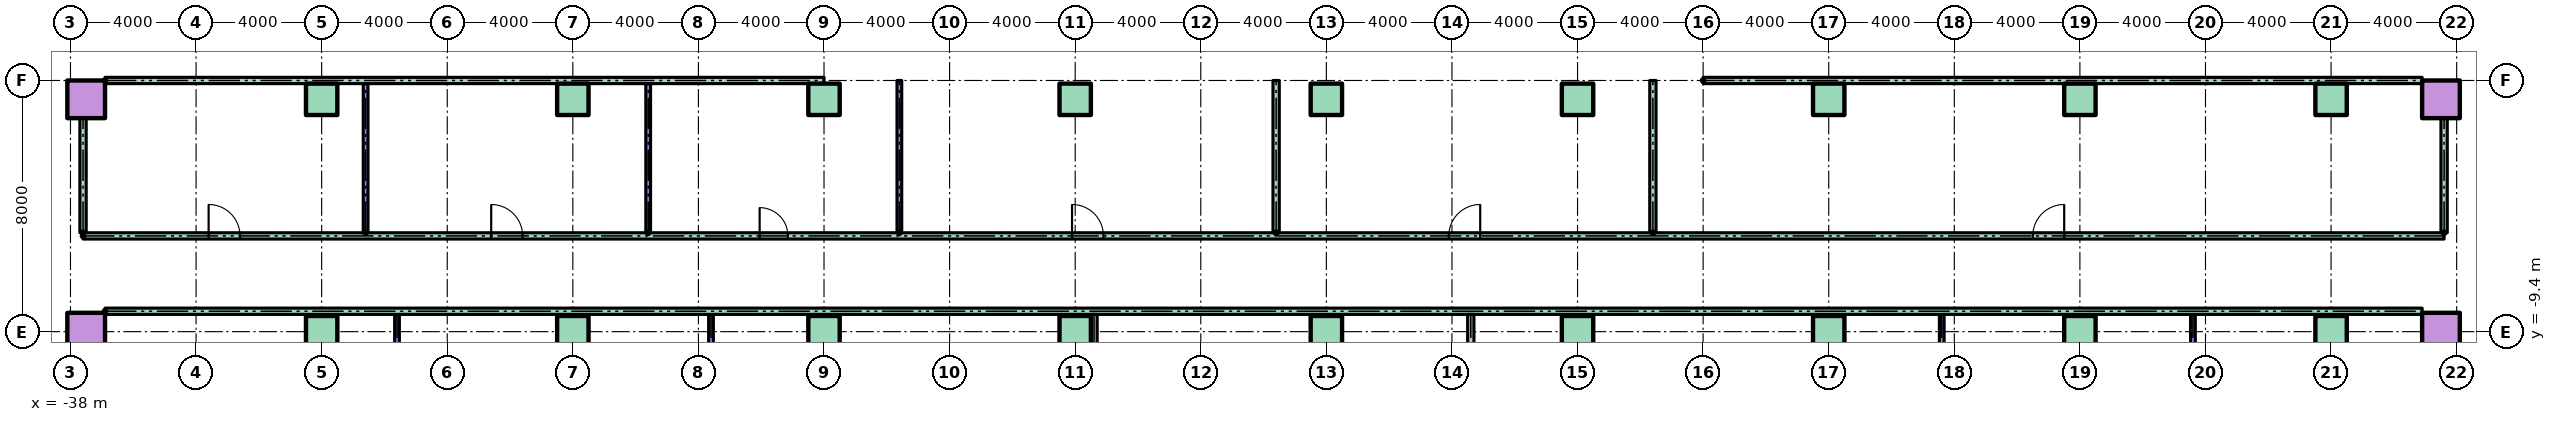
"""IFC4 building model, lengths in metres.
Left out: names, types, materials, properties, quantities, classifications, styles, units other than length and angle.
Written with IfcOpenShell. Run it as: python <this file> out.ifc"""

import sys

from ifc_helpers import new_model, si_unit, direction, frame, frame_2d, origin, origin_2d, place, context, subcontext, project, spatial, rectangle, hollow_rectangle, extrude, element, fill, save


model = new_model("IFC4")
c1 = context("Model", 3, precision=1e-05, world=origin(), true_north=direction((0.0, 1.0)))
c2 = subcontext(c1, "Body", "Model", "MODEL_VIEW")
j1 = project(units=[si_unit("LENGTHUNIT", "METRE"), si_unit("PLANEANGLEUNIT", "RADIAN")], contexts=[c1])
p1 = place(None, origin())
s1 = spatial("IfcSite", under=j1, at=p1, CompositionType="ELEMENT")
p2 = place(p1, origin())
s2 = spatial("IfcBuilding", under=s1, at=p2, CompositionType="ELEMENT")
p3 = place(p2, frame((0.0, 0.0, 6.0)))
s3 = spatial("IfcBuildingStorey", under=s2, at=p3, CompositionType="ELEMENT", Elevation=6.0)
p4 = place(p3, frame((-37.5, -9.4, 0.0)))
e1 = element("IfcColumn", 1, at=p4, inside=s3, PredefinedType="COLUMN", context=c2, shape_type="SweptSolid", body=[
    extrude(hollow_rectangle(XDim=1.2, YDim=1.2, WallThickness=0.06, at=origin_2d()), origin(), (0.0, 0.0, 1.0), 4.0),
])
for number, where in (
    (2, (-30.0, -9.4, 0.0)),
    (3, (-22.0, -9.4, 0.0)),
    (4, (-14.0, -9.4, 0.0)),
    (5, (-6.0, -9.4, 0.0)),
    (6, (2.0, -9.4, 0.0)),
    (7, (10.0, -9.4, 0.0)),
    (8, (18.0, -9.4, 0.0)),
    (9, (26.0, -9.4, 0.0)),
    (10, (34.0, -9.4, 0.0)),
):
    element("IfcColumn", number, at=place(p3, frame(where)), inside=s3, PredefinedType="COLUMN", context=c2, shape_type="SweptSolid", body=[
        extrude(rectangle(XDim=1.0, YDim=1.0, at=origin_2d()), origin(), (0.0, 0.0, 1.0), 4.0),
    ])
for number, where in (
    (11, (37.5, -9.4, 0.0)),
    (12, (-37.5, -2.0, 0.0)),
):
    element("IfcColumn", number, at=place(p3, frame(where)), inside=s3, PredefinedType="COLUMN", context=c2, shape_type="SweptSolid", body=[
        extrude(hollow_rectangle(XDim=1.2, YDim=1.2, WallThickness=0.06, at=origin_2d()), origin(), (0.0, 0.0, 1.0), 4.0),
    ])
for number, where in (
    (13, (-30.0, -2.0, 0.0)),
    (14, (-22.0, -2.0, 0.0)),
    (15, (-14.0, -2.0, 0.0)),
    (16, (-6.0, -2.0, 0.0)),
    (17, (2.0, -2.0, 0.0)),
    (18, (10.0, -2.0, 0.0)),
    (19, (18.0, -2.0, 0.0)),
    (20, (26.0, -2.0, 0.0)),
    (21, (34.0, -2.0, 0.0)),
):
    element("IfcColumn", number, at=place(p3, frame(where)), inside=s3, PredefinedType="COLUMN", context=c2, shape_type="SweptSolid", body=[
        extrude(rectangle(XDim=1.0, YDim=1.0, at=origin_2d()), origin(), (0.0, 0.0, 1.0), 4.0),
    ])
p5 = place(p3, frame((37.5, -2.0, 0.0)))
e22 = element("IfcColumn", 22, at=p5, inside=s3, PredefinedType="COLUMN", context=c2, shape_type="SweptSolid", body=[
    extrude(hollow_rectangle(XDim=1.2, YDim=1.2, WallThickness=0.06, at=origin_2d()), origin(), (0.0, 0.0, 1.0), 4.0),
])
p6 = place(p3, frame((-36.9, -8.75, 0.0)))
e23 = element("IfcWall", 23, at=p6, inside=s3, PredefinedType="PARTITIONING", context=c2, shape_type="SweptSolid", body=[
    extrude(rectangle(XDim=73.8, YDim=0.2, at=frame_2d((36.9, 0.0))), origin(), (0.0, 0.0, 1.0), 3.7),
])
p7 = place(p3, frame((-37.6, -6.35, 0.0)))
e24 = element("IfcWall", 24, at=p7, inside=s3, PredefinedType="PARTITIONING", context=c2, shape_type="SweptSolid", body=[
    extrude(rectangle(XDim=75.2, YDim=0.2, at=frame_2d((37.6, 0.0))), origin(), (0.0, 0.0, 1.0), 3.7),
])
p8 = place(p7, frame((4.0, 0.0, 0.0)))
e25 = element("IfcOpeningElement", 25, at=p8, cuts=e24, PredefinedType="OPENING", context=c2, shape_type="SweptSolid", body=[
    extrude(rectangle(XDim=1.0, YDim=2.1, at=frame_2d((0.5, 1.05))), frame((0.0, 0.11, 0.0), z_axis=(0.0, -1.0, 0.0), x_axis=(1.0, 0.0, 0.0)), (0.0, 0.0, 1.0), 0.22),
])
p9 = place(p7, frame((13.0, 0.0, 0.0)))
e26 = element("IfcOpeningElement", 26, at=p9, cuts=e24, PredefinedType="OPENING", context=c2, shape_type="SweptSolid", body=[
    extrude(rectangle(XDim=1.0, YDim=2.1, at=frame_2d((0.5, 1.05))), frame((0.0, 0.11, 0.0), z_axis=(0.0, -1.0, 0.0), x_axis=(1.0, 0.0, 0.0)), (0.0, 0.0, 1.0), 0.22),
])
p10 = place(p7, frame((21.55, 0.0, 0.0)))
e27 = element("IfcOpeningElement", 27, at=p10, cuts=e24, PredefinedType="OPENING", context=c2, shape_type="SweptSolid", body=[
    extrude(rectangle(XDim=0.9, YDim=2.1, at=frame_2d((0.45, 1.05))), frame((0.0, 0.11, 0.0), z_axis=(0.0, -1.0, 0.0), x_axis=(1.0, 0.0, 0.0)), (0.0, 0.0, 1.0), 0.22),
])
p11 = place(p7, frame((31.5, 0.0, 0.0)))
e28 = element("IfcOpeningElement", 28, at=p11, cuts=e24, PredefinedType="OPENING", context=c2, shape_type="SweptSolid", body=[
    extrude(rectangle(XDim=1.0, YDim=2.1, at=frame_2d((0.5, 1.05))), frame((0.0, 0.11, 0.0), z_axis=(0.0, -1.0, 0.0), x_axis=(1.0, 0.0, 0.0)), (0.0, 0.0, 1.0), 0.22),
])
p12 = place(p7, frame((43.5, 0.0, 0.0)))
e29 = element("IfcOpeningElement", 29, at=p12, cuts=e24, PredefinedType="OPENING", context=c2, shape_type="SweptSolid", body=[
    extrude(rectangle(XDim=1.0, YDim=2.1, at=frame_2d((0.5, 1.05))), frame((0.0, 0.11, 0.0), z_axis=(0.0, -1.0, 0.0), x_axis=(1.0, 0.0, 0.0)), (0.0, 0.0, 1.0), 0.22),
])
p13 = place(p7, frame((62.1, 0.0, 0.0)))
e30 = element("IfcOpeningElement", 30, at=p13, cuts=e24, PredefinedType="OPENING", context=c2, shape_type="SweptSolid", body=[
    extrude(rectangle(XDim=1.0, YDim=2.1, at=frame_2d((0.5, 1.05))), frame((0.0, 0.11, 0.0), z_axis=(0.0, -1.0, 0.0), x_axis=(1.0, 0.0, 0.0)), (0.0, 0.0, 1.0), 0.22),
])
for number, where in (
    (31, (-36.9, -1.4, 0.0)),
    (32, (14.0, -1.4, 0.0)),
):
    element("IfcWall", number, at=place(p3, frame(where)), inside=s3, PredefinedType="PARTITIONING", context=c2, shape_type="SweptSolid", body=[
        extrude(rectangle(XDim=22.9, YDim=0.2, at=frame_2d((11.45, 0.0))), origin(), (0.0, 0.0, 1.0), 3.7),
    ])
p14 = place(p3, frame((-37.6, -6.25, 0.0), z_axis=(0.0, 0.0, 1.0), x_axis=(0.0, 1.0, 0.0)))
e33 = element("IfcWall", 33, at=p14, inside=s3, PredefinedType="PARTITIONING", context=c2, shape_type="SweptSolid", body=[
    extrude(rectangle(XDim=3.65, YDim=0.2, at=frame_2d((1.825, 0.0))), origin(), (0.0, 0.0, 1.0), 3.7),
])
p15 = place(p3, frame((-28.6, -6.25, 0.0), z_axis=(0.0, 0.0, 1.0), x_axis=(0.0, 1.0, 0.0)))
e34 = element("IfcWall", 34, at=p15, inside=s3, PredefinedType="PARTITIONING", context=c2, shape_type="SweptSolid", body=[
    extrude(rectangle(XDim=4.75, YDim=0.15, at=frame_2d((2.375, 0.0))), origin(), (0.0, 0.0, 1.0), 3.7),
])
p16 = place(p3, frame((-27.6, -19.5, 0.0), z_axis=(0.0, 0.0, 1.0), x_axis=(0.0, 1.0, 0.0)))
e35 = element("IfcWall", 35, at=p16, inside=s3, PredefinedType="PARTITIONING", context=c2, shape_type="SweptSolid", body=[
    extrude(rectangle(XDim=10.65, YDim=0.15, at=frame_2d((5.325, 0.0))), origin(), (0.0, 0.0, 1.0), 3.7),
])
p17 = place(p3, frame((-19.6, -6.25, 0.0), z_axis=(0.0, 0.0, 1.0), x_axis=(0.0, 1.0, 0.0)))
e36 = element("IfcWall", 36, at=p17, inside=s3, PredefinedType="PARTITIONING", context=c2, shape_type="SweptSolid", body=[
    extrude(rectangle(XDim=4.75, YDim=0.15, at=frame_2d((2.375, 0.0))), origin(), (0.0, 0.0, 1.0), 3.7),
])
p18 = place(p3, frame((-17.6, -19.5, 0.0), z_axis=(0.0, 0.0, 1.0), x_axis=(0.0, 1.0, 0.0)))
e37 = element("IfcWall", 37, at=p18, inside=s3, PredefinedType="PARTITIONING", context=c2, shape_type="SweptSolid", body=[
    extrude(rectangle(XDim=10.65, YDim=0.15, at=frame_2d((5.325, 0.0))), origin(), (0.0, 0.0, 1.0), 3.7),
])
p19 = place(p3, frame((-11.6, -6.25, 0.0), z_axis=(0.0, 0.0, 1.0), x_axis=(0.0, 1.0, 0.0)))
e38 = element("IfcWall", 38, at=p19, inside=s3, PredefinedType="PARTITIONING", context=c2, shape_type="SweptSolid", body=[
    extrude(rectangle(XDim=4.85, YDim=0.15, at=frame_2d((2.425, 0.0))), origin(), (0.0, 0.0, 1.0), 3.7),
])
p20 = place(p3, frame((-5.4, -16.5, 0.0), z_axis=(0.0, 0.0, 1.0), x_axis=(0.0, 1.0, 0.0)))
e39 = element("IfcWall", 39, at=p20, inside=s3, PredefinedType="PARTITIONING", context=c2, shape_type="SweptSolid", body=[
    extrude(rectangle(XDim=7.65, YDim=0.2, at=frame_2d((3.825, 0.0))), origin(), (0.0, 0.0, 1.0), 3.7),
])
p21 = place(p3, frame((0.4, -6.25, 0.0), z_axis=(0.0, 0.0, 1.0), x_axis=(0.0, 1.0, 0.0)))
e40 = element("IfcWall", 40, at=p21, inside=s3, PredefinedType="PARTITIONING", context=c2, shape_type="SweptSolid", body=[
    extrude(rectangle(XDim=4.85, YDim=0.2, at=frame_2d((2.425, 0.0))), origin(), (0.0, 0.0, 1.0), 3.7),
])
p22 = place(p3, frame((6.6, -19.5, 0.0), z_axis=(0.0, 0.0, 1.0), x_axis=(0.0, 1.0, 0.0)))
e41 = element("IfcWall", 41, at=p22, inside=s3, PredefinedType="PARTITIONING", context=c2, shape_type="SweptSolid", body=[
    extrude(rectangle(XDim=10.65, YDim=0.2, at=frame_2d((5.325, 0.0))), origin(), (0.0, 0.0, 1.0), 3.7),
])
p23 = place(p3, frame((12.4, -6.25, 0.0), z_axis=(0.0, 0.0, 1.0), x_axis=(0.0, 1.0, 0.0)))
e42 = element("IfcWall", 42, at=p23, inside=s3, PredefinedType="PARTITIONING", context=c2, shape_type="SweptSolid", body=[
    extrude(rectangle(XDim=4.85, YDim=0.2, at=frame_2d((2.425, 0.0))), origin(), (0.0, 0.0, 1.0), 3.7),
])
for number, where, z_axis, x_axis in (
    (43, (21.6, -19.5, 0.0), (0.0, 0.0, 1.0), (0.0, 1.0, 0.0)),
    (44, (29.6, -19.5, 0.0), (0.0, 0.0, 1.0), (0.0, 1.0, 0.0)),
):
    element("IfcWall", number, at=place(p3, frame(where, z_axis=z_axis, x_axis=x_axis)), inside=s3, PredefinedType="PARTITIONING", context=c2, shape_type="SweptSolid", body=[
        extrude(rectangle(XDim=10.65, YDim=0.15, at=frame_2d((5.325, 0.0))), origin(), (0.0, 0.0, 1.0), 3.7),
    ])
p24 = place(p3, frame((37.6, -6.25, 0.0), z_axis=(0.0, 0.0, 1.0), x_axis=(0.0, 1.0, 0.0)))
e45 = element("IfcWall", 45, at=p24, inside=s3, PredefinedType="PARTITIONING", context=c2, shape_type="SweptSolid", body=[
    extrude(rectangle(XDim=3.65, YDim=0.2, at=frame_2d((1.825, 0.0))), origin(), (0.0, 0.0, 1.0), 3.7),
])
p25 = place(p8, origin())
e46 = element("IfcDoor", 46, at=p25, inside=s3, OperationType="SINGLE_SWING_LEFT", PredefinedType="DOOR", context=c2, shape_type="SweptSolid", body=[
    extrude(rectangle(XDim=1.0, YDim=2.1, at=frame_2d((0.5, 1.05))), frame((0.0, 0.025, 0.0), z_axis=(0.0, -1.0, 0.0), x_axis=(1.0, 0.0, 0.0)), (0.0, 0.0, 1.0), 0.05),
])
fill(e25, e46)
p26 = place(p9, origin())
e47 = element("IfcDoor", 47, at=p26, inside=s3, OperationType="SINGLE_SWING_LEFT", PredefinedType="DOOR", context=c2, shape_type="SweptSolid", body=[
    extrude(rectangle(XDim=1.0, YDim=2.1, at=frame_2d((0.5, 1.05))), frame((0.0, 0.025, 0.0), z_axis=(0.0, -1.0, 0.0), x_axis=(1.0, 0.0, 0.0)), (0.0, 0.0, 1.0), 0.05),
])
fill(e26, e47)
p27 = place(p10, origin())
e48 = element("IfcDoor", 48, at=p27, inside=s3, OperationType="SINGLE_SWING_LEFT", PredefinedType="DOOR", context=c2, shape_type="SweptSolid", body=[
    extrude(rectangle(XDim=0.9, YDim=2.1, at=frame_2d((0.45, 1.05))), frame((0.0, 0.025, 0.0), z_axis=(0.0, -1.0, 0.0), x_axis=(1.0, 0.0, 0.0)), (0.0, 0.0, 1.0), 0.05),
])
fill(e27, e48)
p28 = place(p11, origin())
e49 = element("IfcDoor", 49, at=p28, inside=s3, OperationType="SINGLE_SWING_LEFT", PredefinedType="DOOR", context=c2, shape_type="SweptSolid", body=[
    extrude(rectangle(XDim=1.0, YDim=2.1, at=frame_2d((0.5, 1.05))), frame((0.0, 0.025, 0.0), z_axis=(0.0, -1.0, 0.0), x_axis=(1.0, 0.0, 0.0)), (0.0, 0.0, 1.0), 0.05),
])
fill(e28, e49)
p29 = place(p12, origin())
e50 = element("IfcDoor", 50, at=p29, inside=s3, OperationType="SINGLE_SWING_RIGHT", PredefinedType="DOOR", context=c2, shape_type="SweptSolid", body=[
    extrude(rectangle(XDim=1.0, YDim=2.1, at=frame_2d((0.5, 1.05))), frame((0.0, 0.025, 0.0), z_axis=(0.0, -1.0, 0.0), x_axis=(1.0, 0.0, 0.0)), (0.0, 0.0, 1.0), 0.05),
])
fill(e29, e50)
p30 = place(p13, origin())
e51 = element("IfcDoor", 51, at=p30, inside=s3, OperationType="SINGLE_SWING_RIGHT", PredefinedType="DOOR", context=c2, shape_type="SweptSolid", body=[
    extrude(rectangle(XDim=1.0, YDim=2.1, at=frame_2d((0.5, 1.05))), frame((0.0, 0.025, 0.0), z_axis=(0.0, -1.0, 0.0), x_axis=(1.0, 0.0, 0.0)), (0.0, 0.0, 1.0), 0.05),
])
fill(e30, e51)
save(model, sys.argv[1])
